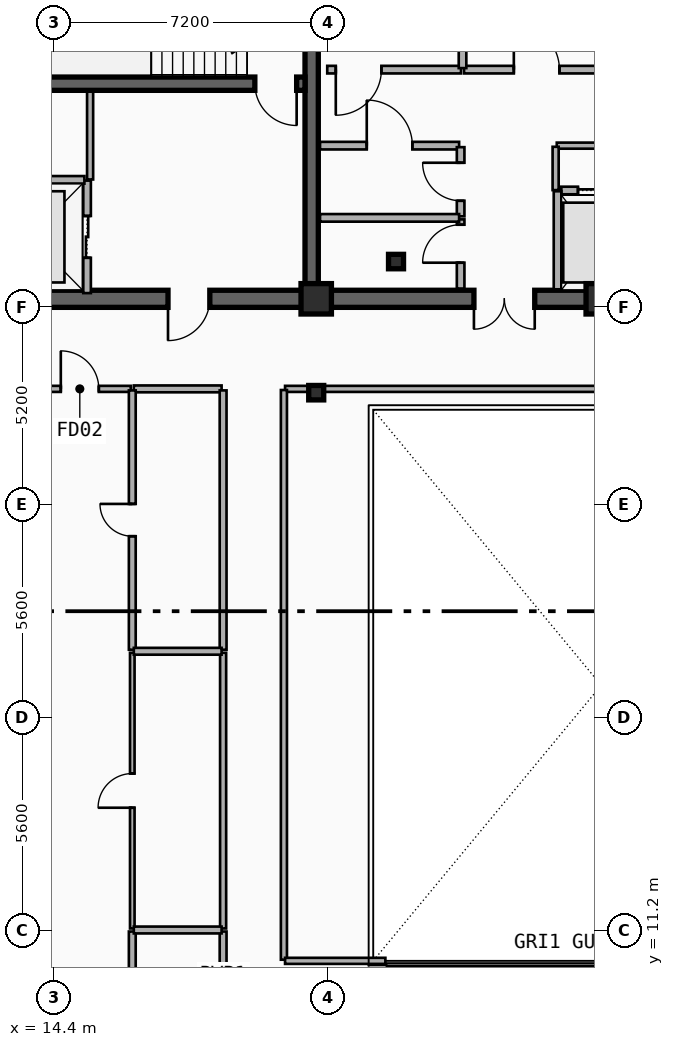
"""IFC4 building model, lengths in metres.
Left out: names, types, materials, properties, quantities, classifications, styles, units other than length and angle.
Written with IfcOpenShell. Run it as: python <this file> out.ifc"""

import sys

from ifc_helpers import new_model, si_unit, direction, frame, frame_2d, origin, origin_2d, place, context, subcontext, project, spatial, rectangle, i_section, extrude, element, fill, save


model = new_model("IFC4")
c1 = context("Model", 3, precision=1e-05, world=origin(), true_north=direction((0.0, 1.0)))
c2 = subcontext(c1, "Body", "Model", "MODEL_VIEW")
j1 = project(units=[si_unit("LENGTHUNIT", "METRE"), si_unit("PLANEANGLEUNIT", "RADIAN")], contexts=[c1])
p1 = place(None, origin())
s1 = spatial("IfcSite", under=j1, at=p1, CompositionType="ELEMENT")
p2 = place(p1, origin())
s2 = spatial("IfcBuilding", under=s1, at=p2, CompositionType="ELEMENT")
p3 = place(p2, frame((0.0, 0.0, 243.6)))
s3 = spatial("IfcBuildingStorey", under=s2, at=p3, CompositionType="ELEMENT", Elevation=243.6)
p4 = place(p3, frame((21.18, 27.82, 0.0), z_axis=(0.0, 0.0, 1.0), x_axis=(-1.0, 0.0, 0.0)))
e1 = element("IfcWall", 1, at=p4, inside=s3, PredefinedType="SHEAR", context=c2, shape_type="SweptSolid", body=[
    extrude(rectangle(XDim=9.03, YDim=0.45, at=frame_2d((4.515, 0.0))), origin(), (0.0, 0.0, 1.0), 3.7),
])
p5 = place(p4, frame((2.68, 0.0, 0.0)))
e2 = element("IfcOpeningElement", 2, at=p5, cuts=e1, PredefinedType="OPENING", context=c2, shape_type="SweptSolid", body=[
    extrude(rectangle(XDim=1.1, YDim=2.15, at=frame_2d((0.55, 1.075))), frame((0.0, 0.235, 0.0), z_axis=(0.0, -1.0, 0.0), x_axis=(1.0, 0.0, 0.0)), (0.0, 0.0, 1.0), 0.47),
])
p6 = place(p3, frame((33.15, 27.82, 0.0), z_axis=(0.0, 0.0, 1.0), x_axis=(-1.0, 0.0, 0.0)))
e3 = element("IfcWall", 3, at=p6, inside=s3, PredefinedType="SHEAR", context=c2, shape_type="SweptSolid", body=[
    extrude(rectangle(XDim=11.97, YDim=0.45, at=frame_2d((5.985, 0.0))), origin(), (0.0, 0.0, 1.0), 3.7),
])
p7 = place(p6, frame((6.1, 0.0, 0.0)))
e4 = element("IfcOpeningElement", 4, at=p7, cuts=e3, PredefinedType="OPENING", context=c2, shape_type="SweptSolid", body=[
    extrude(rectangle(XDim=1.6, YDim=2.2, at=frame_2d((0.8, 1.1))), frame((0.0, 0.235, 0.0), z_axis=(0.0, -1.0, 0.0), x_axis=(1.0, 0.0, 0.0)), (0.0, 0.0, 1.0), 0.47),
])
p8 = place(p3, frame((21.18, 28.045, 0.0), z_axis=(0.0, 0.0, 1.0), x_axis=(0.0, 1.0, 0.0)))
e5 = element("IfcWall", 5, at=p8, inside=s3, PredefinedType="SHEAR", context=c2, shape_type="SweptSolid", body=[
    extrude(rectangle(XDim=8.78, YDim=0.35, at=frame_2d((4.39, 0.0))), origin(), (0.0, 0.0, 1.0), 3.7),
])
p9 = place(p3, frame((21.005, 33.48, 0.0), z_axis=(0.0, 0.0, 1.0), x_axis=(-1.0, 0.0, 0.0)))
e6 = element("IfcWall", 6, at=p9, inside=s3, PredefinedType="SHEAR", context=c2, shape_type="SweptSolid", body=[
    extrude(rectangle(XDim=8.63, YDim=0.35, at=frame_2d((4.315, 0.0))), origin(), (0.0, 0.0, 1.0), 3.7),
])
p10 = place(p9, frame((0.22, 0.0, 0.0)))
e7 = element("IfcOpeningElement", 7, at=p10, cuts=e6, PredefinedType="OPENING", context=c2, shape_type="SweptSolid", body=[
    extrude(rectangle(XDim=1.1, YDim=2.15, at=frame_2d((0.55, 1.075))), frame((0.0, 0.185, 0.0), z_axis=(0.0, -1.0, 0.0), x_axis=(1.0, 0.0, 0.0)), (0.0, 0.0, 1.0), 0.37),
])
p11 = place(p3, frame((23.4, 28.8, 0.0), z_axis=(0.0, 0.0, 1.0), x_axis=(1.0, 0.0, 0.0)))
e8 = element("IfcColumn", 8, at=p11, inside=s3, PredefinedType="COLUMN", context=c2, shape_type="SweptSolid", body=[
    extrude(i_section(OverallWidth=0.395, OverallDepth=0.38, WebThickness=0.019, FlangeThickness=0.03, FilletRadius=0.015, at=origin_2d()), origin(), (0.0, 0.0, 1.0), 3.7),
])
for number, where, z_axis, x_axis in (
    (9, (21.3, 27.82, 0.0), (0.0, 0.0, 1.0), (1.0, 0.0, 0.0)),
    (10, (28.8, 27.82, 0.0), (0.0, 0.0, 1.0), (1.0, 0.0, 0.0)),
):
    element("IfcColumn", number, at=place(p3, frame(where, z_axis=z_axis, x_axis=x_axis)), inside=s3, PredefinedType="COLUMN", context=c2, shape_type="SweptSolid", body=[
        extrude(rectangle(XDim=0.8, YDim=0.8, at=origin_2d()), origin(), (0.0, 0.0, 1.0), 3.7),
    ])
p12 = place(p3, frame((21.3, 25.35, 0.0), z_axis=(0.0, 0.0, 1.0), x_axis=(1.0, 0.0, 0.0)))
e11 = element("IfcColumn", 11, at=p12, inside=s3, PredefinedType="COLUMN", context=c2, shape_type="SweptSolid", body=[
    extrude(i_section(OverallWidth=0.395, OverallDepth=0.38, WebThickness=0.019, FlangeThickness=0.03, FilletRadius=0.015, at=origin_2d()), origin(), (0.0, 0.0, 1.0), 3.7),
])
p13 = place(p3, frame((15.27, 27.97, 0.0), z_axis=(0.0, 0.0, 1.0), x_axis=(0.0, 1.0, 0.0)))
e12 = element("IfcWall", 12, at=p13, inside=s3, PredefinedType="PARTITIONING", context=c2, shape_type="SweptSolid", body=[
    extrude(rectangle(XDim=2.96, YDim=0.2, at=frame_2d((1.48, 0.0))), origin(), (0.0, 0.0, 1.0), 2.49),
])
p14 = place(p13, frame((0.93, 0.0, 0.0)))
e13 = element("IfcOpeningElement", 13, at=p14, cuts=e12, PredefinedType="OPENING", context=c2, shape_type="SweptSolid", body=[
    extrude(rectangle(XDim=1.1, YDim=2.15, at=frame_2d((0.55, 1.075))), frame((0.0, 0.11, 0.0), z_axis=(0.0, -1.0, 0.0), x_axis=(1.0, 0.0, 0.0)), (0.0, 0.0, 1.0), 0.22),
])
p15 = place(p3, frame((12.45, 30.95, 0.0), z_axis=(0.0, 0.0, 1.0), x_axis=(1.0, 0.0, 0.0)))
e14 = element("IfcWall", 14, at=p15, inside=s3, PredefinedType="PARTITIONING", context=c2, shape_type="SweptSolid", body=[
    extrude(rectangle(XDim=2.75, YDim=0.2, at=frame_2d((1.375, 0.0))), origin(), (0.0, 0.0, 1.0), 2.49),
])
p16 = place(p3, frame((27.75, 30.67, 0.0), z_axis=(0.0, 0.0, 1.0), x_axis=(1.0, 0.0, 0.0)))
e15 = element("IfcWall", 15, at=p16, inside=s3, PredefinedType="PARTITIONING", context=c2, shape_type="SweptSolid", body=[
    extrude(rectangle(XDim=1.975, YDim=0.2, at=frame_2d((0.988, 0.0))), origin(), (0.0, 0.0, 1.0), 2.49),
])
p17 = place(p16, frame((0.438, 0.0, 0.0)))
e16 = element("IfcOpeningElement", 16, at=p17, cuts=e15, PredefinedType="OPENING", context=c2, shape_type="SweptSolid", body=[
    extrude(rectangle(XDim=1.1, YDim=2.15, at=frame_2d((0.55, 1.075))), frame((0.0, 0.11, 0.0), z_axis=(0.0, -1.0, 0.0), x_axis=(1.0, 0.0, 0.0)), (0.0, 0.0, 1.0), 0.22),
])
p18 = place(p3, frame((27.65, 28.07, 0.0), z_axis=(0.0, 0.0, 1.0), x_axis=(0.0, 1.0, 0.0)))
e17 = element("IfcWall", 17, at=p18, inside=s3, PredefinedType="PARTITIONING", context=c2, shape_type="SweptSolid", body=[
    extrude(rectangle(XDim=2.58, YDim=0.2, at=frame_2d((1.29, 0.0))), origin(), (0.0, 0.0, 1.0), 2.49),
])
p19 = place(p3, frame((21.4, 31.85, 0.0), z_axis=(0.0, 0.0, 1.0), x_axis=(1.0, 0.0, 0.0)))
e18 = element("IfcWall", 18, at=p19, inside=s3, PredefinedType="PARTITIONING", context=c2, shape_type="SweptSolid", body=[
    extrude(rectangle(XDim=3.66, YDim=0.2, at=frame_2d((1.83, 0.0))), origin(), (0.0, 0.0, 1.0), 2.49),
])
p20 = place(p19, frame((1.23, 0.0, 0.0)))
e19 = element("IfcOpeningElement", 19, at=p20, cuts=e18, PredefinedType="OPENING", context=c2, shape_type="SweptSolid", body=[
    extrude(rectangle(XDim=1.2, YDim=2.15, at=frame_2d((0.6, 1.075))), frame((0.0, 0.11, 0.0), z_axis=(0.0, -1.0, 0.0), x_axis=(1.0, 0.0, 0.0)), (0.0, 0.0, 1.0), 0.22),
])
p21 = place(p3, frame((25.11, 33.85, 0.0), z_axis=(0.0, 0.0, 1.0), x_axis=(-1.0, 0.0, 0.0)))
e20 = element("IfcWall", 20, at=p21, inside=s3, PredefinedType="PARTITIONING", context=c2, shape_type="SweptSolid", body=[
    extrude(rectangle(XDim=3.52, YDim=0.2, at=frame_2d((1.76, 0.0))), origin(), (0.0, 0.0, 1.0), 2.49),
])
p22 = place(p21, frame((2.095, 0.0, 0.0)))
e21 = element("IfcOpeningElement", 21, at=p22, cuts=e20, PredefinedType="OPENING", context=c2, shape_type="SweptSolid", body=[
    extrude(rectangle(XDim=1.2, YDim=2.15, at=frame_2d((0.6, 1.075))), frame((0.0, 0.11, 0.0), z_axis=(0.0, -1.0, 0.0), x_axis=(1.0, 0.0, 0.0)), (0.0, 0.0, 1.0), 0.22),
])
p23 = place(p3, frame((25.19, 33.85, 0.0), z_axis=(0.0, 0.0, 1.0), x_axis=(1.0, 0.0, 0.0)))
e22 = element("IfcWall", 22, at=p23, inside=s3, PredefinedType="PARTITIONING", context=c2, shape_type="SweptSolid", body=[
    extrude(rectangle(XDim=3.82, YDim=0.2, at=frame_2d((1.91, 0.0))), origin(), (0.0, 0.0, 1.0), 2.49),
])
p24 = place(p23, frame((1.31, 0.0, 0.0)))
e23 = element("IfcOpeningElement", 23, at=p24, cuts=e22, PredefinedType="OPENING", context=c2, shape_type="SweptSolid", body=[
    extrude(rectangle(XDim=1.2, YDim=2.15, at=frame_2d((0.6, 1.075))), frame((0.0, 0.11, 0.0), z_axis=(0.0, -1.0, 0.0), x_axis=(1.0, 0.0, 0.0)), (0.0, 0.0, 1.0), 0.22),
])
p25 = place(p3, frame((25.1, 28.09, 0.0), z_axis=(0.0, 0.0, 1.0), x_axis=(0.0, 1.0, 0.0)))
e24 = element("IfcWall", 24, at=p25, inside=s3, PredefinedType="PARTITIONING", context=c2, shape_type="SweptSolid", body=[
    extrude(rectangle(XDim=1.82, YDim=0.2, at=frame_2d((0.91, 0.0))), origin(), (0.0, 0.0, 1.0), 2.8),
])
p26 = place(p25, frame((0.68, 0.0, 0.0)))
e25 = element("IfcOpeningElement", 25, at=p26, cuts=e24, PredefinedType="OPENING", context=c2, shape_type="SweptSolid", body=[
    extrude(rectangle(XDim=1.0, YDim=2.15, at=frame_2d((0.5, 1.075))), frame((0.0, 0.11, 0.0), z_axis=(0.0, -1.0, 0.0), x_axis=(1.0, 0.0, 0.0)), (0.0, 0.0, 1.0), 0.22),
])
p27 = place(p3, frame((25.1, 29.99, 0.0), z_axis=(0.0, 0.0, 1.0), x_axis=(0.0, 1.0, 0.0)))
e26 = element("IfcWall", 26, at=p27, inside=s3, PredefinedType="PARTITIONING", context=c2, shape_type="SweptSolid", body=[
    extrude(rectangle(XDim=1.82, YDim=0.2, at=frame_2d((0.91, 0.0))), origin(), (0.0, 0.0, 1.0), 3.42),
])
p28 = place(p27, frame((0.41, 0.0, 0.0)))
e27 = element("IfcOpeningElement", 27, at=p28, cuts=e26, PredefinedType="OPENING", context=c2, shape_type="SweptSolid", body=[
    extrude(rectangle(XDim=1.0, YDim=2.15, at=frame_2d((0.5, 1.075))), frame((0.0, 0.11, 0.0), z_axis=(0.0, -1.0, 0.0), x_axis=(1.0, 0.0, 0.0)), (0.0, 0.0, 1.0), 0.22),
])
p29 = place(p3, frame((21.4, 29.95, 0.0), z_axis=(0.0, 0.0, 1.0), x_axis=(1.0, 0.0, 0.0)))
e28 = element("IfcWall", 28, at=p29, inside=s3, PredefinedType="PARTITIONING", context=c2, shape_type="SweptSolid", body=[
    extrude(rectangle(XDim=3.66, YDim=0.2, at=frame_2d((1.83, 0.0))), origin(), (0.0, 0.0, 1.0), 2.49),
])
p30 = place(p3, frame((25.15, 33.89, 0.0), z_axis=(0.0, 0.0, 1.0), x_axis=(0.0, 1.0, 0.0)))
e29 = element("IfcWall", 29, at=p30, inside=s3, PredefinedType="PARTITIONING", context=c2, shape_type="SweptSolid", body=[
    extrude(rectangle(XDim=2.72, YDim=0.2, at=frame_2d((1.36, 0.0))), origin(), (0.0, 0.0, 1.0), 3.42),
])
p31 = place(p3, frame((13.738, 25.45, 0.0), z_axis=(0.0, 0.0, 1.0), x_axis=(1.0, 0.0, 0.0)))
e30 = element("IfcWall", 30, at=p31, inside=s3, PredefinedType="PARTITIONING", context=c2, shape_type="SweptSolid", body=[
    extrude(rectangle(XDim=2.682, YDim=0.16, at=frame_2d((1.341, 0.0))), origin(), (0.0, 0.0, 1.0), 3.42),
])
p32 = place(p31, frame((0.841, 0.0, 0.0)))
e31 = element("IfcOpeningElement", 31, at=p32, cuts=e30, PredefinedType="OPENING", context=c2, shape_type="SweptSolid", body=[
    extrude(rectangle(XDim=1.0, YDim=2.15, at=frame_2d((0.5, 1.075))), frame((0.0, 0.09, 0.0), z_axis=(0.0, -1.0, 0.0), x_axis=(1.0, 0.0, 0.0)), (0.0, 0.0, 1.0), 0.18),
])
p33 = place(p3, frame((16.5, 25.45, 0.0), z_axis=(0.0, 0.0, 1.0), x_axis=(1.0, 0.0, 0.0)))
e32 = element("IfcWall", 32, at=p33, inside=s3, PredefinedType="PLUMBINGWALL", context=c2, shape_type="SweptSolid", body=[
    extrude(rectangle(XDim=2.31, YDim=0.18, at=frame_2d((1.155, 0.0))), origin(), (0.0, 0.0, 1.0), 3.42),
])
p34 = place(p3, frame((18.85, 8.89, 0.0), z_axis=(0.0, 0.0, 1.0), x_axis=(0.0, 1.0, 0.0)))
e33 = element("IfcWall", 33, at=p34, inside=s3, PredefinedType="PLUMBINGWALL", context=c2, shape_type="SweptSolid", body=[
    extrude(rectangle(XDim=2.282, YDim=0.18, at=frame_2d((1.141, 0.0))), origin(), (0.0, 0.0, 1.0), 2.9),
])
p35 = place(p3, frame((18.85, 11.252, 0.0), z_axis=(0.0, 0.0, 1.0), x_axis=(0.0, 1.0, 0.0)))
e34 = element("IfcWall", 34, at=p35, inside=s3, PredefinedType="PARTITIONING", context=c2, shape_type="SweptSolid", body=[
    extrude(rectangle(XDim=7.254, YDim=0.16, at=frame_2d((3.627, 0.0))), origin(), (0.0, 0.0, 1.0), 2.9),
])
p36 = place(p3, frame((18.85, 18.586, 0.0), z_axis=(0.0, 0.0, 1.0), x_axis=(0.0, 1.0, 0.0)))
e35 = element("IfcWall", 35, at=p36, inside=s3, PredefinedType="PLUMBINGWALL", context=c2, shape_type="SweptSolid", body=[
    extrude(rectangle(XDim=6.824, YDim=0.18, at=frame_2d((3.412, 0.0))), origin(), (0.0, 0.0, 1.0), 2.9),
])
p37 = place(p3, frame((16.46, -1.34, 0.0), z_axis=(0.0, 0.0, 1.0), x_axis=(0.0, 1.0, 0.0)))
e36 = element("IfcWall", 36, at=p37, inside=s3, PredefinedType="PLUMBINGWALL", context=c2, shape_type="SweptSolid", body=[
    extrude(rectangle(XDim=12.512, YDim=0.18, at=frame_2d((6.256, 0.0))), origin(), (0.0, 0.0, 1.0), 2.9),
])
p38 = place(p37, frame((0.608, 0.0, 0.0)))
e37 = element("IfcOpeningElement", 37, at=p38, cuts=e36, PredefinedType="OPENING", context=c2, shape_type="SweptSolid", body=[
    extrude(rectangle(XDim=1.0, YDim=2.15, at=frame_2d((0.5, 1.075))), frame((0.0, 0.1, 0.0), z_axis=(0.0, -1.0, 0.0), x_axis=(1.0, 0.0, 0.0)), (0.0, 0.0, 1.0), 0.2),
])
p39 = place(p3, frame((16.46, 11.252, 0.0), z_axis=(0.0, 0.0, 1.0), x_axis=(0.0, 1.0, 0.0)))
e38 = element("IfcWall", 38, at=p39, inside=s3, PredefinedType="PARTITIONING", context=c2, shape_type="SweptSolid", body=[
    extrude(rectangle(XDim=7.254, YDim=0.12, at=frame_2d((3.627, 0.0))), origin(), (0.0, 0.0, 1.0), 2.9),
])
p40 = place(p39, frame((3.177, 0.0, 0.0)))
e39 = element("IfcOpeningElement", 39, at=p40, cuts=e38, PredefinedType="OPENING", context=c2, shape_type="SweptSolid", body=[
    extrude(rectangle(XDim=0.9, YDim=2.1, at=frame_2d((0.45, 1.05))), frame((0.0, 0.07, 0.0), z_axis=(0.0, -1.0, 0.0), x_axis=(1.0, 0.0, 0.0)), (0.0, 0.0, 1.0), 0.14),
])
p41 = place(p3, frame((16.46, 18.586, 0.0), z_axis=(0.0, 0.0, 1.0), x_axis=(0.0, 1.0, 0.0)))
e40 = element("IfcWall", 40, at=p41, inside=s3, PredefinedType="PLUMBINGWALL", context=c2, shape_type="SweptSolid", body=[
    extrude(rectangle(XDim=6.824, YDim=0.18, at=frame_2d((3.412, 0.0))), origin(), (0.0, 0.0, 1.0), 2.9),
])
p42 = place(p41, frame((2.987, 0.0, 0.0)))
e41 = element("IfcOpeningElement", 41, at=p42, cuts=e40, PredefinedType="OPENING", context=c2, shape_type="SweptSolid", body=[
    extrude(rectangle(XDim=0.85, YDim=2.1, at=frame_2d((0.425, 1.05))), frame((0.0, 0.1, 0.0), z_axis=(0.0, -1.0, 0.0), x_axis=(1.0, 0.0, 0.0)), (0.0, 0.0, 1.0), 0.2),
])
p43 = place(p3, frame((16.5, 11.212, 0.0), z_axis=(0.0, 0.0, 1.0), x_axis=(1.0, 0.0, 0.0)))
e42 = element("IfcWall", 42, at=p43, inside=s3, PredefinedType="PLUMBINGWALL", context=c2, shape_type="SweptSolid", body=[
    extrude(rectangle(XDim=2.31, YDim=0.18, at=frame_2d((1.155, 0.0))), origin(), (0.0, 0.0, 1.0), 2.9),
])
p44 = place(p3, frame((16.5, 18.546, 0.0), z_axis=(0.0, 0.0, 1.0), x_axis=(1.0, 0.0, 0.0)))
e43 = element("IfcWall", 43, at=p44, inside=s3, PredefinedType="PLUMBINGWALL", context=c2, shape_type="SweptSolid", body=[
    extrude(rectangle(XDim=2.31, YDim=0.18, at=frame_2d((1.155, 0.0))), origin(), (0.0, 0.0, 1.0), 3.42),
])
p45 = place(p3, frame((15.35, 30.96, 0.0), z_axis=(0.0, 0.0, 1.0), x_axis=(0.0, 1.0, 0.0)))
e44 = element("IfcWall", 44, at=p45, inside=s3, PredefinedType="PARTITIONING", context=c2, shape_type="SweptSolid", body=[
    extrude(rectangle(XDim=2.31, YDim=0.16, at=frame_2d((1.155, 0.0))), origin(), (0.0, 0.0, 1.0), 3.42),
])
p46 = place(p3, frame((27.63, 31.85, 0.0), z_axis=(0.0, 0.0, 1.0), x_axis=(1.0, 0.0, 0.0)))
e45 = element("IfcWall", 45, at=p46, inside=s3, PredefinedType="PARTITIONING", context=c2, shape_type="SweptSolid", body=[
    extrude(rectangle(XDim=5.31, YDim=0.16, at=frame_2d((2.655, 0.0))), origin(), (0.0, 0.0, 1.0), 2.49),
])
p47 = place(p3, frame((27.6, 30.68, 0.0), z_axis=(0.0, 0.0, 1.0), x_axis=(0.0, 1.0, 0.0)))
e46 = element("IfcWall", 46, at=p47, inside=s3, PredefinedType="PARTITIONING", context=c2, shape_type="SweptSolid", body=[
    extrude(rectangle(XDim=1.14, YDim=0.16, at=frame_2d((0.57, 0.0))), origin(), (0.0, 0.0, 1.0), 3.42),
])
p48 = place(p3, frame((20.48, 25.45, 0.0), z_axis=(0.0, 0.0, 1.0), x_axis=(1.0, 0.0, 0.0)))
e47 = element("IfcWall", 47, at=p48, inside=s3, PredefinedType="PARTITIONING", context=c2, shape_type="SweptSolid", body=[
    extrude(rectangle(XDim=15.84, YDim=0.16, at=frame_2d((7.92, 0.0))), origin(), (0.0, 0.0, 1.0), 2.7),
])
p49 = place(p3, frame((20.45, 10.43, 0.0), z_axis=(0.0, 0.0, 1.0), x_axis=(0.0, 1.0, 0.0)))
e48 = element("IfcWall", 48, at=p49, inside=s3, PredefinedType="PARTITIONING", context=c2, shape_type="SweptSolid", body=[
    extrude(rectangle(XDim=14.99, YDim=0.16, at=frame_2d((7.495, 0.0))), origin(), (0.0, 0.0, 1.0), 2.9),
])
p50 = place(p3, frame((20.48, 10.4, 0.0), z_axis=(0.0, 0.0, 1.0), x_axis=(1.0, 0.0, 0.0)))
e49 = element("IfcWall", 49, at=p50, inside=s3, PredefinedType="PARTITIONING", context=c2, shape_type="SweptSolid", body=[
    extrude(rectangle(XDim=2.64, YDim=0.16, at=frame_2d((1.32, 0.0))), origin(), (0.0, 0.0, 1.0), 2.7),
])
p51 = place(p14, origin())
e50 = element("IfcDoor", 50, at=p51, inside=s3, OperationType="DOUBLE_DOOR_SLIDING", PredefinedType="DOOR", context=c2, shape_type="SweptSolid", body=[
    extrude(rectangle(XDim=1.1, YDim=2.15, at=frame_2d((0.55, 1.075))), frame((0.0, 0.025, 0.0), z_axis=(0.0, -1.0, 0.0), x_axis=(1.0, 0.0, 0.0)), (0.0, 0.0, 1.0), 0.05),
])
fill(e13, e50)
p52 = place(p17, origin())
e51 = element("IfcDoor", 51, at=p52, inside=s3, OperationType="DOUBLE_DOOR_SLIDING", PredefinedType="DOOR", context=c2, shape_type="SweptSolid", body=[
    extrude(rectangle(XDim=1.1, YDim=2.15, at=frame_2d((0.55, 1.075))), frame((0.0, 0.025, 0.0), z_axis=(0.0, -1.0, 0.0), x_axis=(1.0, 0.0, 0.0)), (0.0, 0.0, 1.0), 0.05),
])
fill(e16, e51)
p53 = place(p10, origin())
e52 = element("IfcDoor", 52, at=p53, inside=s3, OperationType="SINGLE_SWING_LEFT", PredefinedType="DOOR", context=c2, shape_type="SweptSolid", body=[
    extrude(rectangle(XDim=1.1, YDim=2.15, at=frame_2d((0.55, 1.075))), frame((0.0, 0.025, 0.0), z_axis=(0.0, -1.0, 0.0), x_axis=(1.0, 0.0, 0.0)), (0.0, 0.0, 1.0), 0.05),
])
fill(e7, e52)
p54 = place(p5, origin())
e53 = element("IfcDoor", 53, at=p54, inside=s3, OperationType="SINGLE_SWING_RIGHT", PredefinedType="DOOR", context=c2, shape_type="SweptSolid", body=[
    extrude(rectangle(XDim=1.1, YDim=2.15, at=frame_2d((0.55, 1.075))), frame((0.0, 0.025, 0.0), z_axis=(0.0, -1.0, 0.0), x_axis=(1.0, 0.0, 0.0)), (0.0, 0.0, 1.0), 0.05),
])
fill(e2, e53)
p55 = place(p7, origin())
e54 = element("IfcDoor", 54, at=p55, inside=s3, OperationType="SINGLE_SWING_LEFT", PredefinedType="DOOR", context=c2, shape_type="SweptSolid", body=[
    extrude(rectangle(XDim=1.6, YDim=2.2, at=frame_2d((0.8, 1.1))), frame((0.0, 0.025, 0.0), z_axis=(0.0, -1.0, 0.0), x_axis=(1.0, 0.0, 0.0)), (0.0, 0.0, 1.0), 0.05),
])
fill(e4, e54)
p56 = place(p20, origin())
e55 = element("IfcDoor", 55, at=p56, inside=s3, OperationType="SINGLE_SWING_LEFT", PredefinedType="DOOR", context=c2, shape_type="SweptSolid", body=[
    extrude(rectangle(XDim=1.2, YDim=2.15, at=frame_2d((0.6, 1.075))), frame((0.0, 0.025, 0.0), z_axis=(0.0, -1.0, 0.0), x_axis=(1.0, 0.0, 0.0)), (0.0, 0.0, 1.0), 0.05),
])
fill(e19, e55)
p57 = place(p22, origin())
e56 = element("IfcDoor", 56, at=p57, inside=s3, OperationType="SINGLE_SWING_RIGHT", PredefinedType="DOOR", context=c2, shape_type="SweptSolid", body=[
    extrude(rectangle(XDim=1.2, YDim=2.15, at=frame_2d((0.6, 1.075))), frame((0.0, 0.025, 0.0), z_axis=(0.0, -1.0, 0.0), x_axis=(1.0, 0.0, 0.0)), (0.0, 0.0, 1.0), 0.05),
])
fill(e21, e56)
p58 = place(p24, origin())
e57 = element("IfcDoor", 57, at=p58, inside=s3, OperationType="SINGLE_SWING_LEFT", PredefinedType="DOOR", context=c2, shape_type="SweptSolid", body=[
    extrude(rectangle(XDim=1.2, YDim=2.15, at=frame_2d((0.6, 1.075))), frame((0.0, 0.025, 0.0), z_axis=(0.0, -1.0, 0.0), x_axis=(1.0, 0.0, 0.0)), (0.0, 0.0, 1.0), 0.05),
])
fill(e23, e57)
p59 = place(p26, origin())
e58 = element("IfcDoor", 58, at=p59, inside=s3, OperationType="SINGLE_SWING_LEFT", PredefinedType="DOOR", context=c2, shape_type="SweptSolid", body=[
    extrude(rectangle(XDim=1.0, YDim=2.15, at=frame_2d((0.5, 1.075))), frame((0.0, 0.025, 0.0), z_axis=(0.0, -1.0, 0.0), x_axis=(1.0, 0.0, 0.0)), (0.0, 0.0, 1.0), 0.05),
])
fill(e25, e58)
p60 = place(p28, origin())
e59 = element("IfcDoor", 59, at=p60, inside=s3, OperationType="SINGLE_SWING_RIGHT", PredefinedType="DOOR", context=c2, shape_type="SweptSolid", body=[
    extrude(rectangle(XDim=1.0, YDim=2.15, at=frame_2d((0.5, 1.075))), frame((0.0, 0.025, 0.0), z_axis=(0.0, -1.0, 0.0), x_axis=(1.0, 0.0, 0.0)), (0.0, 0.0, 1.0), 0.05),
])
fill(e27, e59)
p61 = place(p32, origin())
e60 = element("IfcDoor", 60, at=p61, inside=s3, OperationType="SINGLE_SWING_LEFT", PredefinedType="DOOR", context=c2, shape_type="SweptSolid", body=[
    extrude(rectangle(XDim=1.0, YDim=2.15, at=frame_2d((0.5, 1.075))), frame((0.0, 0.025, 0.0), z_axis=(0.0, -1.0, 0.0), x_axis=(1.0, 0.0, 0.0)), (0.0, 0.0, 1.0), 0.05),
])
fill(e31, e60)
p62 = place(p40, origin())
e61 = element("IfcDoor", 61, at=p62, inside=s3, OperationType="SINGLE_SWING_LEFT", PredefinedType="DOOR", context=c2, shape_type="SweptSolid", body=[
    extrude(rectangle(XDim=0.9, YDim=2.1, at=frame_2d((0.45, 1.05))), frame((0.0, 0.025, 0.0), z_axis=(0.0, -1.0, 0.0), x_axis=(1.0, 0.0, 0.0)), (0.0, 0.0, 1.0), 0.05),
])
fill(e39, e61)
p63 = place(p42, origin())
e62 = element("IfcDoor", 62, at=p63, inside=s3, OperationType="SINGLE_SWING_RIGHT", PredefinedType="DOOR", context=c2, shape_type="SweptSolid", body=[
    extrude(rectangle(XDim=0.85, YDim=2.1, at=frame_2d((0.425, 1.05))), frame((0.0, 0.025, 0.0), z_axis=(0.0, -1.0, 0.0), x_axis=(1.0, 0.0, 0.0)), (0.0, 0.0, 1.0), 0.05),
])
fill(e41, e62)
save(model, sys.argv[1])
